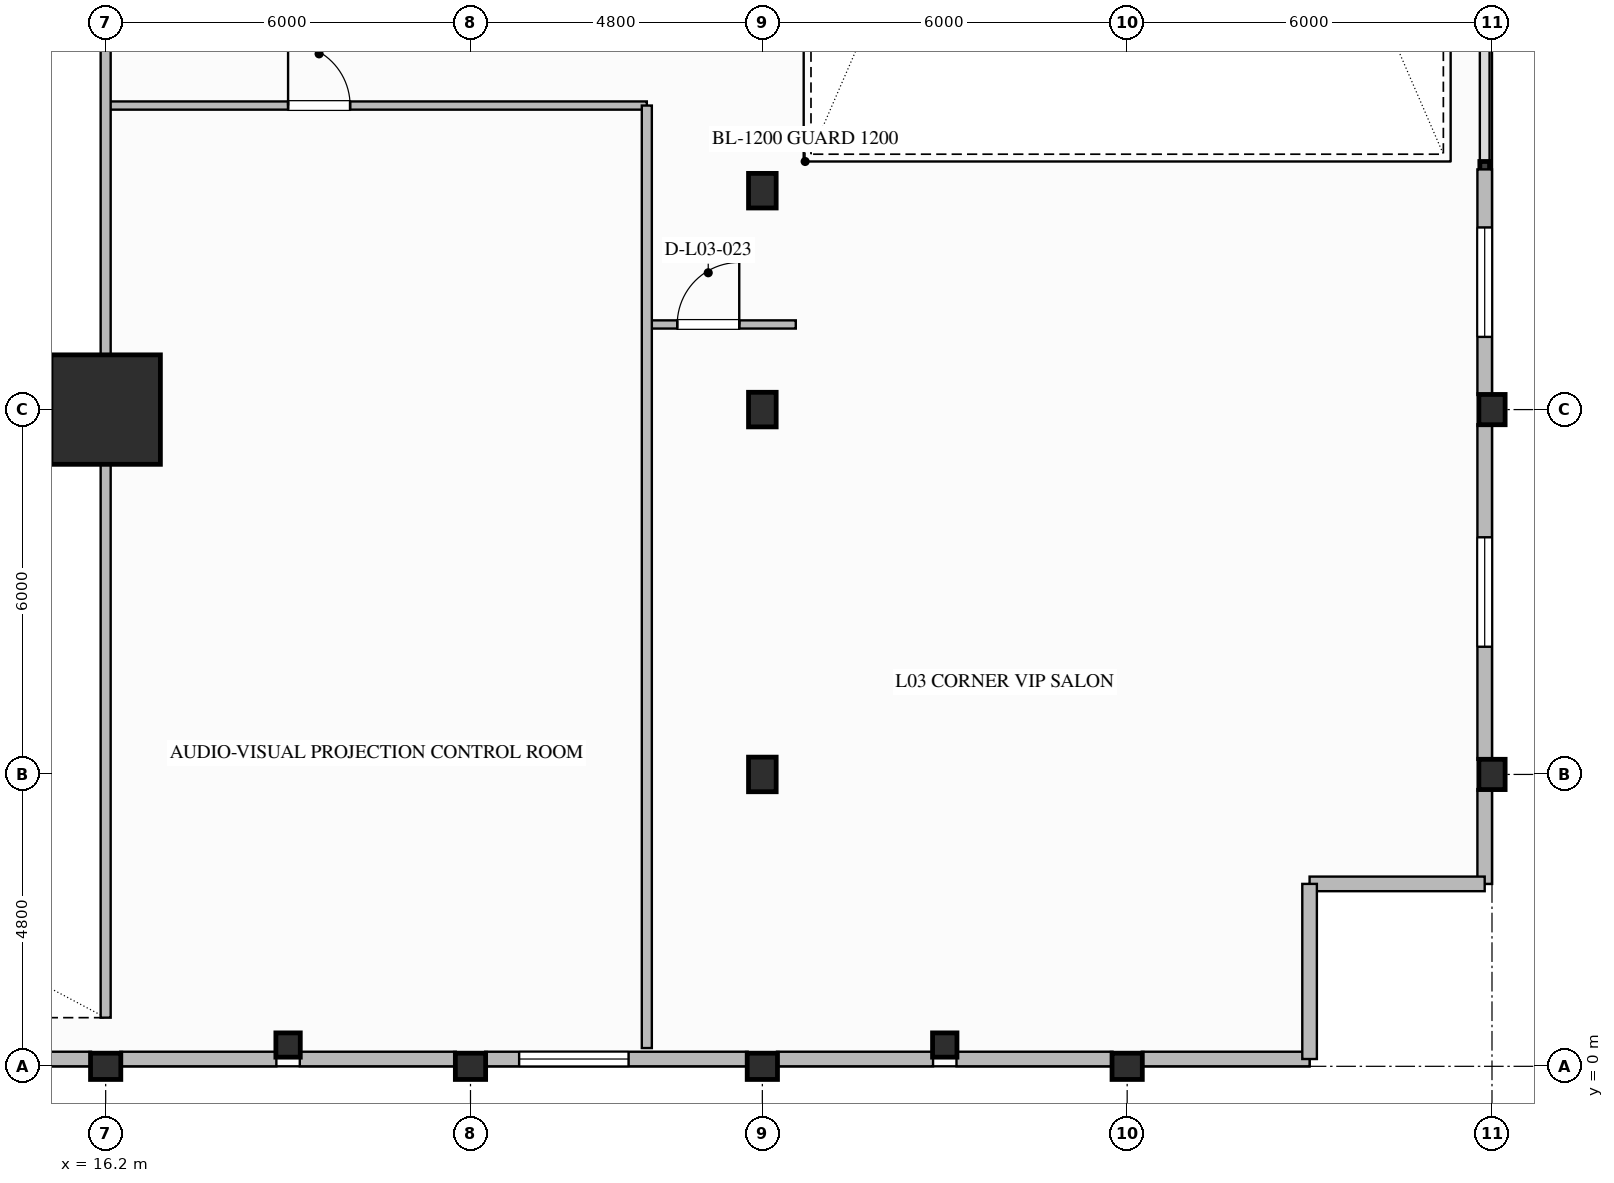
"""IFC4 building model, lengths in metres.
Left out: names, types, materials, properties, quantities, classifications, styles, units other than length and angle.
Written with IfcOpenShell. Run it as: python <this file> out.ifc"""

import sys

from ifc_helpers import new_model, si_unit, direction, frame, frame_2d, origin, origin_2d, place, context, subcontext, project, spatial, rectangle, i_section, extrude, element, fill, save


model = new_model("IFC4")
c1 = context("Model", 3, precision=1e-05, world=origin(), true_north=direction((0.0, 1.0)))
c2 = subcontext(c1, "Body", "Model", "MODEL_VIEW")
j1 = project(units=[si_unit("LENGTHUNIT", "METRE"), si_unit("PLANEANGLEUNIT", "RADIAN")], contexts=[c1])
p1 = place(None, origin())
s1 = spatial("IfcSite", under=j1, at=p1, CompositionType="ELEMENT")
p2 = place(p1, origin())
s2 = spatial("IfcBuilding", under=s1, at=p2, CompositionType="ELEMENT")
p3 = place(p2, frame((0.0, 0.0, 17.2)))
s3 = spatial("IfcBuildingStorey", under=s2, at=p3, CompositionType="ELEMENT", Elevation=17.2)
p4 = place(p3, frame((16.2, 10.8, 0.0), z_axis=(0.0, 0.0, 1.0), x_axis=(1.0, 0.0, 0.0)))
e1 = element("IfcColumn", 1, at=p4, inside=s3, PredefinedType="COLUMN", context=c2, shape_type="SweptSolid", body=[
    extrude(rectangle(XDim=1.8, YDim=1.8, at=origin_2d()), origin(), (0.0, 0.0, 1.0), 5.2),
])
for number, where, z_axis, x_axis in (
    (2, (39.0, 4.8, 0.0), (0.0, 0.0, 1.0), (1.0, 0.0, 0.0)),
    (3, (39.0, 10.8, 0.0), (0.0, 0.0, 1.0), (1.0, 0.0, 0.0)),
    (4, (16.2, 0.0, 0.0), (0.0, 0.0, 1.0), (0.0, 1.0, 0.0)),
    (5, (22.2, 0.0, 0.0), (0.0, 0.0, 1.0), (0.0, 1.0, 0.0)),
    (6, (27.0, 0.0, 0.0), (0.0, 0.0, 1.0), (0.0, 1.0, 0.0)),
    (7, (33.0, 0.0, 0.0), (0.0, 0.0, 1.0), (0.0, 1.0, 0.0)),
):
    element("IfcColumn", number, at=place(p3, frame(where, z_axis=z_axis, x_axis=x_axis)), inside=s3, PredefinedType="COLUMN", context=c2, shape_type="SweptSolid", body=[
        extrude(i_section(OverallWidth=0.432, OverallDepth=0.498, WebThickness=0.056, FlangeThickness=0.089, FilletRadius=0.03, at=origin_2d()), origin(), (0.0, 0.0, 1.0), 5.2),
    ])
for number, where, z_axis, x_axis in (
    (8, (27.0, 4.8, 0.0), (0.0, 0.0, 1.0), (1.0, 0.0, 0.0)),
    (9, (27.0, 10.8, 0.0), (0.0, 0.0, 1.0), (1.0, 0.0, 0.0)),
    (10, (27.0, 14.4, 0.0), (0.0, 0.0, 1.0), (1.0, 0.0, 0.0)),
):
    element("IfcColumn", number, at=place(p3, frame(where, z_axis=z_axis, x_axis=x_axis)), inside=s3, PredefinedType="COLUMN", context=c2, shape_type="SweptSolid", body=[
        extrude(i_section(OverallWidth=0.454, OverallDepth=0.569, WebThickness=0.078, FlangeThickness=0.125, FilletRadius=0.03, at=origin_2d()), origin(), (0.0, 0.0, 1.0), 5.2),
    ])
for number, where, z_axis, x_axis in (
    (11, (19.2, 0.35, 0.0), (0.0, 0.0, 1.0), (1.0, 0.0, 0.0)),
    (12, (30.0, 0.35, 0.0), (0.0, 0.0, 1.0), (1.0, 0.0, 0.0)),
):
    element("IfcColumn", number, at=place(p3, frame(where, z_axis=z_axis, x_axis=x_axis)), inside=s3, PredefinedType="COLUMN", context=c2, shape_type="SweptSolid", body=[
        extrude(i_section(OverallWidth=0.401, OverallDepth=0.399, WebThickness=0.025, FlangeThickness=0.04, FilletRadius=0.025, at=origin_2d()), origin(), (0.0, 0.0, 1.0), 5.2),
    ])
p5 = place(p3, frame((38.88, 4.559, 0.0), z_axis=(0.0, 0.0, 1.0), x_axis=(0.0, -1.0, 0.0)))
e13 = element("IfcWall", 13, at=p5, inside=s3, PredefinedType="STANDARD", context=c2, shape_type="SweptSolid", body=[
    extrude(rectangle(XDim=1.559, YDim=0.24, at=frame_2d((0.78, 0.0))), origin(), (0.0, 0.0, 1.0), 4.9),
])
p6 = place(p3, frame((38.88, 10.559, 0.0), z_axis=(0.0, 0.0, 1.0), x_axis=(0.0, -1.0, 0.0)))
e14 = element("IfcWall", 14, at=p6, inside=s3, PredefinedType="STANDARD", context=c2, shape_type="SweptSolid", body=[
    extrude(rectangle(XDim=5.518, YDim=0.24, at=frame_2d((2.759, 0.0))), origin(), (0.0, 0.0, 1.0), 4.205),
])
p7 = place(p6, frame((1.859, 0.0, 0.85)))
e15 = element("IfcOpeningElement", 15, at=p7, cuts=e14, PredefinedType="OPENING", context=c2, shape_type="SweptSolid", body=[
    extrude(rectangle(XDim=1.8, YDim=2.2, at=frame_2d((0.9, 1.1))), frame((0.0, 0.13, 0.0), z_axis=(0.0, -1.0, 0.0), x_axis=(1.0, 0.0, 0.0)), (0.0, 0.0, 1.0), 0.26),
])
p8 = place(p3, frame((38.88, 14.75, 0.0), z_axis=(0.0, 0.0, 1.0), x_axis=(0.0, -1.0, 0.0)))
e16 = element("IfcWall", 16, at=p8, inside=s3, PredefinedType="STANDARD", context=c2, shape_type="SweptSolid", body=[
    extrude(rectangle(XDim=3.709, YDim=0.24, at=frame_2d((1.854, 0.0))), origin(), (0.0, 0.0, 1.0), 4.205),
])
p9 = place(p8, frame((0.955, 0.0, 0.85)))
e17 = element("IfcOpeningElement", 17, at=p9, cuts=e16, PredefinedType="OPENING", context=c2, shape_type="SweptSolid", body=[
    extrude(rectangle(XDim=1.8, YDim=2.2, at=frame_2d((0.9, 1.1))), frame((0.0, 0.13, 0.0), z_axis=(0.0, -1.0, 0.0), x_axis=(1.0, 0.0, 0.0)), (0.0, 0.0, 1.0), 0.26),
])
p10 = place(p3, frame((15.959, 0.12, 0.0), z_axis=(0.0, 0.0, 1.0), x_axis=(-1.0, 0.0, 0.0)))
e18 = element("IfcWall", 18, at=p10, inside=s3, PredefinedType="STANDARD", context=c2, shape_type="SweptSolid", body=[
    extrude(rectangle(XDim=3.466, YDim=0.24, at=frame_2d((1.733, 0.0))), origin(), (0.0, 0.0, 1.0), 4.205),
])
p11 = place(p10, frame((0.833, 0.0, 0.65)))
e19 = element("IfcOpeningElement", 19, at=p11, cuts=e18, PredefinedType="OPENING", context=c2, shape_type="SweptSolid", body=[
    extrude(rectangle(XDim=1.8, YDim=2.2, at=frame_2d((0.9, 1.1))), frame((0.0, 0.13, 0.0), z_axis=(0.0, -1.0, 0.0), x_axis=(1.0, 0.0, 0.0)), (0.0, 0.0, 1.0), 0.26),
])
for number, where, z_axis, x_axis in (
    (20, (19.007, 0.12, 0.0), (0.0, 0.0, 1.0), (-1.0, 0.0, 0.0)),
    (21, (21.959, 0.12, 0.0), (0.0, 0.0, 1.0), (-1.0, 0.0, 0.0)),
):
    element("IfcWall", number, at=place(p3, frame(where, z_axis=z_axis, x_axis=x_axis)), inside=s3, PredefinedType="STANDARD", context=c2, shape_type="SweptSolid", body=[
        extrude(rectangle(XDim=2.566, YDim=0.24, at=frame_2d((1.283, 0.0))), origin(), (0.0, 0.0, 1.0), 4.205),
    ])
p12 = place(p3, frame((26.759, 0.12, 0.0), z_axis=(0.0, 0.0, 1.0), x_axis=(-1.0, 0.0, 0.0)))
e22 = element("IfcWall", 22, at=p12, inside=s3, PredefinedType="STANDARD", context=c2, shape_type="SweptSolid", body=[
    extrude(rectangle(XDim=4.318, YDim=0.24, at=frame_2d((2.159, 0.0))), origin(), (0.0, 0.0, 1.0), 4.205),
])
p13 = place(p12, frame((1.959, 0.0, 0.65)))
e23 = element("IfcOpeningElement", 23, at=p13, cuts=e22, PredefinedType="OPENING", context=c2, shape_type="SweptSolid", body=[
    extrude(rectangle(XDim=1.8, YDim=2.2, at=frame_2d((0.9, 1.1))), frame((0.0, 0.13, 0.0), z_axis=(0.0, -1.0, 0.0), x_axis=(1.0, 0.0, 0.0)), (0.0, 0.0, 1.0), 0.26),
])
for number, where, z_axis, x_axis in (
    (24, (29.807, 0.12, 0.0), (0.0, 0.0, 1.0), (-1.0, 0.0, 0.0)),
    (25, (32.759, 0.12, 0.0), (0.0, 0.0, 1.0), (-1.0, 0.0, 0.0)),
):
    element("IfcWall", number, at=place(p3, frame(where, z_axis=z_axis, x_axis=x_axis)), inside=s3, PredefinedType="STANDARD", context=c2, shape_type="SweptSolid", body=[
        extrude(rectangle(XDim=2.566, YDim=0.24, at=frame_2d((1.283, 0.0))), origin(), (0.0, 0.0, 1.0), 4.205),
    ])
p14 = place(p3, frame((36.0, 0.12, 0.0), z_axis=(0.0, 0.0, 1.0), x_axis=(-1.0, 0.0, 0.0)))
e26 = element("IfcWall", 26, at=p14, inside=s3, PredefinedType="STANDARD", context=c2, shape_type="SweptSolid", body=[
    extrude(rectangle(XDim=2.759, YDim=0.24, at=frame_2d((1.379, 0.0))), origin(), (0.0, 0.0, 1.0), 4.9),
])
for number, where, z_axis, x_axis in (
    (27, (38.88, 3.0, 0.0), (0.0, 0.0, 1.0), (-1.0, 0.0, 0.0)),
    (28, (36.0, 3.0, 0.0), (0.0, 0.0, 1.0), (0.0, -1.0, 0.0)),
):
    element("IfcWall", number, at=place(p3, frame(where, z_axis=z_axis, x_axis=x_axis)), inside=s3, PredefinedType="STANDARD", context=c2, shape_type="SweptSolid", body=[
        extrude(rectangle(XDim=2.88, YDim=0.24, at=frame_2d((1.44, 0.0))), origin(), (0.0, 0.0, 1.0), 4.9),
    ])
p15 = place(p3, frame((16.2, 15.8, 0.0), z_axis=(0.0, 0.0, 1.0), x_axis=(1.0, 0.0, 0.0)))
e29 = element("IfcWall", 29, at=p15, inside=s3, PredefinedType="PARTITIONING", context=c2, shape_type="SweptSolid", body=[
    extrude(rectangle(XDim=8.9, YDim=0.135, at=frame_2d((4.45, 0.0))), origin(), (0.0, 0.0, 1.0), 4.9),
])
p16 = place(p15, frame((3.0, 0.0, 0.0)))
e30 = element("IfcOpeningElement", 30, at=p16, cuts=e29, PredefinedType="OPENING", context=c2, shape_type="SweptSolid", body=[
    extrude(rectangle(XDim=1.02, YDim=2.15, at=frame_2d((0.51, 1.075))), frame((0.0, 0.077, 0.0), z_axis=(0.0, -1.0, 0.0), x_axis=(1.0, 0.0, 0.0)), (0.0, 0.0, 1.0), 0.155),
])
p17 = place(p3, frame((25.1, 12.2, 0.0), z_axis=(0.0, 0.0, 1.0), x_axis=(1.0, 0.0, 0.0)))
e31 = element("IfcWall", 31, at=p17, inside=s3, PredefinedType="PARTITIONING", context=c2, shape_type="SweptSolid", body=[
    extrude(rectangle(XDim=2.45, YDim=0.135, at=frame_2d((1.225, 0.0))), origin(), (0.0, 0.0, 1.0), 4.9),
])
p18 = place(p17, frame((0.5, 0.0, 0.0)))
e32 = element("IfcOpeningElement", 32, at=p18, cuts=e31, PredefinedType="OPENING", context=c2, shape_type="SweptSolid", body=[
    extrude(rectangle(XDim=1.02, YDim=2.15, at=frame_2d((0.51, 1.075))), frame((0.0, 0.077, 0.0), z_axis=(0.0, -1.0, 0.0), x_axis=(1.0, 0.0, 0.0)), (0.0, 0.0, 1.0), 0.155),
])
p19 = place(p3, frame((25.1, 0.3, 0.0), z_axis=(0.0, 0.0, 1.0), x_axis=(0.0, 1.0, 0.0)))
e33 = element("IfcWall", 33, at=p19, inside=s3, PredefinedType="PARTITIONING", context=c2, shape_type="SweptSolid", body=[
    extrude(rectangle(XDim=15.5, YDim=0.165, at=frame_2d((7.75, 0.0))), origin(), (0.0, 0.0, 1.0), 4.9),
])
p20 = place(p3, frame((16.2, 0.8, 0.0), z_axis=(0.0, 0.0, 1.0), x_axis=(0.0, 1.0, 0.0)))
e34 = element("IfcWall", 34, at=p20, inside=s3, PredefinedType="PARTITIONING", context=c2, shape_type="SweptSolid", body=[
    extrude(rectangle(XDim=17.44, YDim=0.165, at=frame_2d((8.72, 0.0))), origin(), (0.0, 0.0, 1.0), 3.937),
])
p21 = place(p7, origin())
e35 = element("IfcWindow", 35, at=p21, inside=s3, PartitioningType="SINGLE_PANEL", PredefinedType="WINDOW", context=c2, shape_type="SweptSolid", body=[
    extrude(rectangle(XDim=1.8, YDim=2.2, at=frame_2d((0.9, 1.1))), frame((0.0, 0.03, 0.0), z_axis=(0.0, -1.0, 0.0), x_axis=(1.0, 0.0, 0.0)), (0.0, 0.0, 1.0), 0.06),
])
fill(e15, e35)
p22 = place(p9, origin())
e36 = element("IfcWindow", 36, at=p22, inside=s3, PartitioningType="SINGLE_PANEL", PredefinedType="WINDOW", context=c2, shape_type="SweptSolid", body=[
    extrude(rectangle(XDim=1.8, YDim=2.2, at=frame_2d((0.9, 1.1))), frame((0.0, 0.03, 0.0), z_axis=(0.0, -1.0, 0.0), x_axis=(1.0, 0.0, 0.0)), (0.0, 0.0, 1.0), 0.06),
])
fill(e17, e36)
p23 = place(p13, origin())
e37 = element("IfcWindow", 37, at=p23, inside=s3, PartitioningType="SINGLE_PANEL", PredefinedType="WINDOW", context=c2, shape_type="SweptSolid", body=[
    extrude(rectangle(XDim=1.8, YDim=2.2, at=frame_2d((0.9, 1.1))), frame((0.0, 0.03, 0.0), z_axis=(0.0, -1.0, 0.0), x_axis=(1.0, 0.0, 0.0)), (0.0, 0.0, 1.0), 0.06),
])
fill(e23, e37)
p24 = place(p18, origin())
e38 = element("IfcDoor", 38, at=p24, inside=s3, OperationType="SINGLE_SWING_RIGHT", PredefinedType="DOOR", context=c2, shape_type="SweptSolid", body=[
    extrude(rectangle(XDim=1.02, YDim=2.15, at=frame_2d((0.51, 1.075))), frame((0.0, 0.025, 0.0), z_axis=(0.0, -1.0, 0.0), x_axis=(1.0, 0.0, 0.0)), (0.0, 0.0, 1.0), 0.05),
])
fill(e32, e38)
p25 = place(p16, origin())
e39 = element("IfcDoor", 39, at=p25, inside=s3, OperationType="SINGLE_SWING_LEFT", PredefinedType="DOOR", context=c2, shape_type="SweptSolid", body=[
    extrude(rectangle(XDim=1.02, YDim=2.15, at=frame_2d((0.51, 1.075))), frame((0.0, 0.025, 0.0), z_axis=(0.0, -1.0, 0.0), x_axis=(1.0, 0.0, 0.0)), (0.0, 0.0, 1.0), 0.05),
])
fill(e30, e39)
save(model, sys.argv[1])
